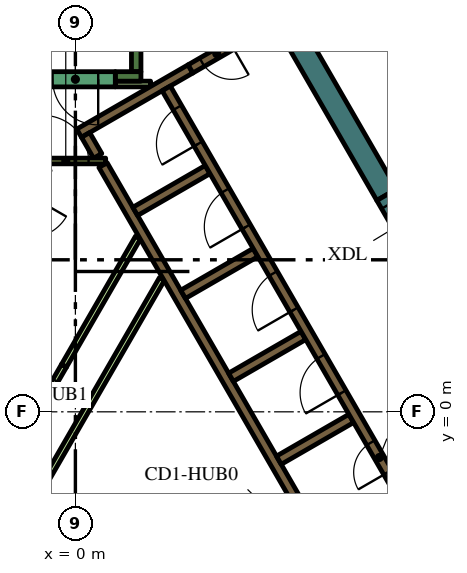
"""IFC4 building model, lengths in metres.
Left out: names, types, materials, properties, quantities, classifications, styles, units other than length and angle.
Written with IfcOpenShell. Run it as: python <this file> out.ifc"""

import sys

from ifc_helpers import new_model, si_unit, direction, frame, frame_2d, origin, place, context, subcontext, project, spatial, rectangle, extrude, element, fill, save


model = new_model("IFC4")
c1 = context("Model", 3, precision=1e-05, world=origin(), true_north=direction((0.0, 1.0)))
c2 = subcontext(c1, "Body", "Model", "MODEL_VIEW")
j1 = project(units=[si_unit("LENGTHUNIT", "METRE"), si_unit("PLANEANGLEUNIT", "RADIAN")], contexts=[c1])
p1 = place(None, origin())
s1 = spatial("IfcSite", under=j1, at=p1, CompositionType="ELEMENT")
p2 = place(p1, origin())
s2 = spatial("IfcBuilding", under=s1, at=p2, CompositionType="ELEMENT")
p3 = place(p2, frame((0.0, 0.0, 300.6)))
s3 = spatial("IfcBuildingStorey", under=s2, at=p3, CompositionType="ELEMENT", Elevation=300.6)
p4 = place(p3, frame((8.192, 5.711, 0.0), z_axis=(0.0, 0.0, 1.0), x_axis=(-0.500006836656, 0.866021456604, 0.0)))
e1 = element("IfcWall", 1, at=p4, inside=s3, PredefinedType="SOLIDWALL", context=c2, shape_type="SweptSolid", body=[
    extrude(rectangle(XDim=5.078, YDim=0.6, at=frame_2d((2.539, 0.0))), origin(), (0.0, 0.0, 1.0), 4.2),
])
p5 = place(p3, frame((1.6, 8.95, 0.0), z_axis=(0.0, 0.0, 1.0), x_axis=(0.0, 1.0, 0.0)))
e2 = element("IfcWall", 2, at=p5, inside=s3, PredefinedType="SOLIDWALL", context=c2, shape_type="SweptSolid", body=[
    extrude(rectangle(XDim=6.8, YDim=0.25, at=frame_2d((3.4, 0.0))), origin(), (0.0, 0.0, 1.0), 4.2),
])
p6 = place(p3, frame((1.05, 8.825, 0.0), z_axis=(0.0, 0.0, 1.0), x_axis=(1.0, 0.0, 0.0)))
e3 = element("IfcWall", 3, at=p6, inside=s3, PredefinedType="SOLIDWALL", context=c2, shape_type="SweptSolid", body=[
    extrude(rectangle(XDim=0.675, YDim=0.25, at=frame_2d((0.337, 0.0))), origin(), (0.0, 0.0, 1.0), 4.2),
])
p7 = place(p3, frame((9.19, -1.969, 0.0), z_axis=(0.0, 0.0, 1.0), x_axis=(-0.866057109641, -0.499945079824, 0.0)))
e4 = element("IfcWall", 4, at=p7, inside=s3, PredefinedType="SOLIDWALL", context=c2, shape_type="SweptSolid", body=[
    extrude(rectangle(XDim=3.291, YDim=0.25, at=frame_2d((1.646, 0.0))), origin(), (0.0, 0.0, 1.0), 4.2),
])
p8 = place(p3, frame((3.028, 9.023, 0.0), z_axis=(0.0, 0.0, 1.0), x_axis=(-0.866036587186, -0.49998062928, 0.0)))
e5 = element("IfcWall", 5, at=p8, inside=s3, PredefinedType="SOLIDWALL", context=c2, shape_type="SweptSolid", body=[
    extrude(rectangle(XDim=3.384, YDim=0.25, at=frame_2d((1.692, 0.0))), origin(), (0.0, 0.0, 1.0), 4.2),
])
p9 = place(p3, frame((0.268, 7.285, 0.0), z_axis=(0.0, 0.0, 1.0), x_axis=(0.500098681536, -0.865968422476, 0.0)))
e6 = element("IfcWall", 6, at=p9, inside=s3, PredefinedType="SOLIDWALL", context=c2, shape_type="SweptSolid", body=[
    extrude(rectangle(XDim=0.636, YDim=0.25, at=frame_2d((0.318, 0.0))), origin(), (0.0, 0.0, 1.0), 4.2),
])
p10 = place(p3, frame((5.97, -2.591, 0.0), z_axis=(0.0, 0.0, 1.0), x_axis=(-0.499994469932, 0.866028596547, 0.0)))
e7 = element("IfcWall", 7, at=p10, inside=s3, PredefinedType="SOLIDWALL", context=c2, shape_type="SweptSolid", body=[
    extrude(rectangle(XDim=10.488, YDim=0.25, at=frame_2d((5.244, 0.0))), origin(), (0.0, 0.0, 1.0), 4.2),
])
p11 = place(p3, frame((1.574, 5.274, 0.0), z_axis=(0.0, 0.0, 1.0), x_axis=(0.866028486751, 0.499994660107, 0.0)))
e8 = element("IfcWall", 8, at=p11, inside=s3, PredefinedType="SOLIDWALL", context=c2, shape_type="SweptSolid", body=[
    extrude(rectangle(XDim=2.2, YDim=0.25, at=frame_2d((1.1, 0.0))), origin(), (0.0, 0.0, 1.0), 4.2),
])
for number, where, z_axis, x_axis in (
    (9, (2.834, 3.091, 0.0), (0.0, 0.0, 1.0), (0.866, 0.5, 0.0)),
    (10, (4.094, 0.909, 0.0), (0.0, 0.0, 1.0), (0.866, 0.5, 0.0)),
    (11, (5.354, -1.274, 0.0), (0.0, 0.0, 1.0), (0.866, 0.5, 0.0)),
):
    element("IfcWall", number, at=place(p3, frame(where, z_axis=z_axis, x_axis=x_axis)), inside=s3, PredefinedType="SOLIDWALL", context=c2, shape_type="SweptSolid", body=[
        extrude(rectangle(XDim=2.2, YDim=0.25, at=frame_2d((1.1, 0.0))), origin(), (0.0, 0.0, 1.0), 4.2),
    ])
p12 = place(p3, frame((1.05, 8.625, 0.0), z_axis=(0.0, 0.0, 1.0), x_axis=(1.0, 0.0, 0.0)))
e12 = element("IfcWall", 12, at=p12, inside=s3, PredefinedType="PARTITIONING", context=c2, shape_type="SweptSolid", body=[
    extrude(rectangle(XDim=0.929, YDim=0.15, at=frame_2d((0.464, 0.0))), origin(), (0.0, 0.0, 1.0), 3.55),
])
p13 = place(p3, frame((-1.887, -3.718, 0.0), z_axis=(0.0, 0.0, 1.0), x_axis=(0.500005008002, 0.866022512394, 0.0)))
e13 = element("IfcWall", 13, at=p13, inside=s3, PredefinedType="PARTITIONING", context=c2, shape_type="SweptSolid", body=[
    extrude(rectangle(XDim=8.327, YDim=0.15, at=frame_2d((4.164, 0.0))), origin(), (0.0, 0.0, 1.0), 3.55),
])
p14 = place(p3, frame((-0.3, 1.212, 0.0), z_axis=(0.0, 0.0, 1.0), x_axis=(0.499963101113, 0.866046706318, 0.0)))
e14 = element("IfcWall", 14, at=p14, inside=s3, PredefinedType="PARTITIONING", context=c2, shape_type="SweptSolid", body=[
    extrude(rectangle(XDim=3.893, YDim=0.15, at=frame_2d((1.947, 0.0))), origin(), (0.0, 0.0, 1.0), 3.55),
])
p15 = place(p3, frame((8.565, -2.185, 0.0), z_axis=(0.0, 0.0, 1.0), x_axis=(-0.499997954832, 0.866026584559, 0.0)))
e15 = element("IfcWall", 15, at=p15, inside=s3, PredefinedType="SOLIDWALL", context=c2, shape_type="SweptSolid", body=[
    extrude(rectangle(XDim=12.35, YDim=0.25, at=frame_2d((6.175, 0.0))), origin(), (0.0, 0.0, 1.0), 4.2),
])
p16 = place(p15, frame((0.685, 0.0, 0.0)))
e16 = element("IfcOpeningElement", 16, at=p16, cuts=e15, PredefinedType="OPENING", context=c2, shape_type="SweptSolid", body=[
    extrude(rectangle(XDim=0.9, YDim=2.1, at=frame_2d((0.45, 1.05))), frame((0.0, 0.135, 0.0), z_axis=(0.0, -1.0, 0.0), x_axis=(1.0, 0.0, 0.0)), (0.0, 0.0, 1.0), 0.27),
])
p17 = place(p15, frame((3.105, 0.0, 0.0)))
e17 = element("IfcOpeningElement", 17, at=p17, cuts=e15, PredefinedType="OPENING", context=c2, shape_type="SweptSolid", body=[
    extrude(rectangle(XDim=1.1, YDim=2.1, at=frame_2d((0.55, 1.05))), frame((0.0, 0.135, 0.0), z_axis=(0.0, -1.0, 0.0), x_axis=(1.0, 0.0, 0.0)), (0.0, 0.0, 1.0), 0.27),
])
p18 = place(p15, frame((5.625, 0.0, 0.0)))
e18 = element("IfcOpeningElement", 18, at=p18, cuts=e15, PredefinedType="OPENING", context=c2, shape_type="SweptSolid", body=[
    extrude(rectangle(XDim=1.1, YDim=2.1, at=frame_2d((0.55, 1.05))), frame((0.0, 0.135, 0.0), z_axis=(0.0, -1.0, 0.0), x_axis=(1.0, 0.0, 0.0)), (0.0, 0.0, 1.0), 0.27),
])
p19 = place(p15, frame((8.145, 0.0, 0.0)))
e19 = element("IfcOpeningElement", 19, at=p19, cuts=e15, PredefinedType="OPENING", context=c2, shape_type="SweptSolid", body=[
    extrude(rectangle(XDim=1.1, YDim=2.1, at=frame_2d((0.55, 1.05))), frame((0.0, 0.135, 0.0), z_axis=(0.0, -1.0, 0.0), x_axis=(1.0, 0.0, 0.0)), (0.0, 0.0, 1.0), 0.27),
])
p20 = place(p15, frame((10.665, 0.0, 0.0)))
e20 = element("IfcOpeningElement", 20, at=p20, cuts=e15, PredefinedType="OPENING", context=c2, shape_type="SweptSolid", body=[
    extrude(rectangle(XDim=1.1, YDim=2.1, at=frame_2d((0.55, 1.05))), frame((0.0, 0.135, 0.0), z_axis=(0.0, -1.0, 0.0), x_axis=(1.0, 0.0, 0.0)), (0.0, 0.0, 1.0), 0.27),
])
p21 = place(p3, frame((1.05, 8.75, 0.0), z_axis=(0.0, 0.0, 1.0), x_axis=(-1.0, 0.0, 0.0)))
e21 = element("IfcWall", 21, at=p21, inside=s3, PredefinedType="SOLIDWALL", context=c2, shape_type="SweptSolid", body=[
    extrude(rectangle(XDim=2.1, YDim=0.4, at=frame_2d((1.05, 0.0))), origin(), (0.0, 0.0, 1.0), 4.2),
])
p22 = place(p21, frame((0.45, 0.0, 0.0)))
e22 = element("IfcOpeningElement", 22, at=p22, cuts=e21, PredefinedType="OPENING", context=c2, shape_type="SweptSolid", body=[
    extrude(rectangle(XDim=1.2, YDim=2.1, at=frame_2d((0.6, 1.05))), frame((0.0, 0.21, 0.0), z_axis=(0.0, -1.0, 0.0), x_axis=(1.0, 0.0, 0.0)), (0.0, 0.0, 1.0), 0.42),
])
p23 = place(p3, frame((5.366, 10.373, 0.0), z_axis=(0.0, 0.0, 1.0), x_axis=(-0.866019956843, -0.50000943426, 0.0)))
e23 = element("IfcWall", 23, at=p23, inside=s3, PredefinedType="SOLIDWALL", context=c2, shape_type="SweptSolid", body=[
    extrude(rectangle(XDim=2.7, YDim=0.25, at=frame_2d((1.35, 0.0))), origin(), (0.0, 0.0, 1.0), 4.2),
])
p24 = place(p23, frame((1.45, 0.0, 0.0)))
e24 = element("IfcOpeningElement", 24, at=p24, cuts=e23, PredefinedType="OPENING", context=c2, shape_type="SweptSolid", body=[
    extrude(rectangle(XDim=0.9, YDim=2.1, at=frame_2d((0.45, 1.05))), frame((0.0, 0.135, 0.0), z_axis=(0.0, -1.0, 0.0), x_axis=(1.0, 0.0, 0.0)), (0.0, 0.0, 1.0), 0.27),
])
p25 = place(p3, frame((-1.303, 6.6, 0.0), z_axis=(0.0, 0.0, 1.0), x_axis=(1.0, 0.0, 0.0)))
e25 = element("IfcWall", 25, at=p25, inside=s3, PredefinedType="PARTITIONING", context=c2, shape_type="SweptSolid", body=[
    extrude(rectangle(XDim=2.1, YDim=0.15, at=frame_2d((1.05, 0.0))), origin(), (0.0, 0.0, 1.0), 4.2),
])
p26 = place(p25, frame((0.45, 0.0, 0.0)))
e26 = element("IfcOpeningElement", 26, at=p26, cuts=e25, PredefinedType="OPENING", context=c2, shape_type="SweptSolid", body=[
    extrude(rectangle(XDim=1.2, YDim=2.1, at=frame_2d((0.6, 1.05))), frame((0.0, 0.085, 0.0), z_axis=(0.0, -1.0, 0.0), x_axis=(1.0, 0.0, 0.0)), (0.0, 0.0, 1.0), 0.17),
])
p27 = place(p3, frame((8.192, 5.711, 0.0), z_axis=(0.0, 0.0, 1.0), x_axis=(0.500062241894, -0.865989465428, 0.0)))
e27 = element("IfcWall", 27, at=p27, inside=s3, PredefinedType="SOLIDWALL", context=c2, shape_type="SweptSolid", body=[
    extrude(rectangle(XDim=1.7, YDim=0.6, at=frame_2d((0.85, 0.0))), origin(), (0.0, 0.0, 1.0), 4.2),
])
p28 = place(p27, frame((0.25, 0.0, 0.0)))
e28 = element("IfcOpeningElement", 28, at=p28, cuts=e27, PredefinedType="OPENING", context=c2, shape_type="SweptSolid", body=[
    extrude(rectangle(XDim=1.2, YDim=2.1, at=frame_2d((0.6, 1.05))), frame((0.0, 0.31, 0.0), z_axis=(0.0, -1.0, 0.0), x_axis=(1.0, 0.0, 0.0)), (0.0, 0.0, 1.0), 0.62),
])
p29 = place(p3, frame((-1.2, -0.346, 0.0), z_axis=(0.0, 0.0, 1.0), x_axis=(0.499961193289, 0.866047807691, 0.0)))
e29 = element("IfcWall", 29, at=p29, inside=s3, PredefinedType="PARTITIONING", context=c2, shape_type="SweptSolid", body=[
    extrude(rectangle(XDim=1.8, YDim=0.15, at=frame_2d((0.9, 0.0))), origin(), (0.0, 0.0, 1.0), 3.55),
])
p30 = place(p29, frame((0.45, 0.0, 0.0)))
e30 = element("IfcOpeningElement", 30, at=p30, cuts=e29, PredefinedType="OPENING", context=c2, shape_type="SweptSolid", body=[
    extrude(rectangle(XDim=0.9, YDim=2.1, at=frame_2d((0.45, 1.05))), frame((0.0, 0.085, 0.0), z_axis=(0.0, -1.0, 0.0), x_axis=(1.0, 0.0, 0.0)), (0.0, 0.0, 1.0), 0.17),
])
p31 = place(p3, frame((13.436, 0.829, 0.0), z_axis=(0.0, 0.0, 1.0), x_axis=(-0.49999894854, 0.866026010844, 0.0)))
e31 = element("IfcWall", 31, at=p31, inside=s3, PredefinedType="PARTITIONING", context=c2, shape_type="SweptSolid", body=[
    extrude(rectangle(XDim=12.0, YDim=0.2, at=frame_2d((6.0, 0.0))), origin(), (0.0, 0.0, 1.0), 3.55),
])
p32 = place(p31, frame((5.5, 0.0, 0.0)))
e32 = element("IfcOpeningElement", 32, at=p32, cuts=e31, PredefinedType="OPENING", context=c2, shape_type="SweptSolid", body=[
    extrude(rectangle(XDim=1.0, YDim=2.1, at=frame_2d((0.5, 1.05))), frame((0.0, 0.11, 0.0), z_axis=(0.0, -1.0, 0.0), x_axis=(1.0, 0.0, 0.0)), (0.0, 0.0, 1.0), 0.22),
])
p33 = place(p16, origin())
e33 = element("IfcDoor", 33, at=p33, inside=s3, OperationType="SINGLE_SWING_LEFT", PredefinedType="DOOR", context=c2, shape_type="SweptSolid", body=[
    extrude(rectangle(XDim=0.9, YDim=2.1, at=frame_2d((0.45, 1.05))), frame((0.0, 0.025, 0.0), z_axis=(0.0, -1.0, 0.0), x_axis=(1.0, 0.0, 0.0)), (0.0, 0.0, 1.0), 0.05),
])
fill(e16, e33)
p34 = place(p17, origin())
e34 = element("IfcDoor", 34, at=p34, inside=s3, OperationType="DOUBLE_DOOR_SLIDING", PredefinedType="DOOR", context=c2, shape_type="SweptSolid", body=[
    extrude(rectangle(XDim=1.1, YDim=2.1, at=frame_2d((0.55, 1.05))), frame((0.0, 0.025, 0.0), z_axis=(0.0, -1.0, 0.0), x_axis=(1.0, 0.0, 0.0)), (0.0, 0.0, 1.0), 0.05),
])
fill(e17, e34)
p35 = place(p18, origin())
e35 = element("IfcDoor", 35, at=p35, inside=s3, OperationType="DOUBLE_DOOR_SLIDING", PredefinedType="DOOR", context=c2, shape_type="SweptSolid", body=[
    extrude(rectangle(XDim=1.1, YDim=2.1, at=frame_2d((0.55, 1.05))), frame((0.0, 0.025, 0.0), z_axis=(0.0, -1.0, 0.0), x_axis=(1.0, 0.0, 0.0)), (0.0, 0.0, 1.0), 0.05),
])
fill(e18, e35)
p36 = place(p19, origin())
e36 = element("IfcDoor", 36, at=p36, inside=s3, OperationType="DOUBLE_DOOR_SLIDING", PredefinedType="DOOR", context=c2, shape_type="SweptSolid", body=[
    extrude(rectangle(XDim=1.1, YDim=2.1, at=frame_2d((0.55, 1.05))), frame((0.0, 0.025, 0.0), z_axis=(0.0, -1.0, 0.0), x_axis=(1.0, 0.0, 0.0)), (0.0, 0.0, 1.0), 0.05),
])
fill(e19, e36)
p37 = place(p20, origin())
e37 = element("IfcDoor", 37, at=p37, inside=s3, OperationType="DOUBLE_DOOR_SLIDING", PredefinedType="DOOR", context=c2, shape_type="SweptSolid", body=[
    extrude(rectangle(XDim=1.1, YDim=2.1, at=frame_2d((0.55, 1.05))), frame((0.0, 0.025, 0.0), z_axis=(0.0, -1.0, 0.0), x_axis=(1.0, 0.0, 0.0)), (0.0, 0.0, 1.0), 0.05),
])
fill(e20, e37)
p38 = place(p22, origin())
e38 = element("IfcDoor", 38, at=p38, inside=s3, OperationType="SINGLE_SWING_LEFT", PredefinedType="DOOR", context=c2, shape_type="SweptSolid", body=[
    extrude(rectangle(XDim=1.2, YDim=2.1, at=frame_2d((0.6, 1.05))), frame((0.0, 0.025, 0.0), z_axis=(0.0, -1.0, 0.0), x_axis=(1.0, 0.0, 0.0)), (0.0, 0.0, 1.0), 0.05),
])
fill(e22, e38)
p39 = place(p24, origin())
e39 = element("IfcDoor", 39, at=p39, inside=s3, OperationType="SINGLE_SWING_LEFT", PredefinedType="DOOR", context=c2, shape_type="SweptSolid", body=[
    extrude(rectangle(XDim=0.9, YDim=2.1, at=frame_2d((0.45, 1.05))), frame((0.0, 0.025, 0.0), z_axis=(0.0, -1.0, 0.0), x_axis=(1.0, 0.0, 0.0)), (0.0, 0.0, 1.0), 0.05),
])
fill(e24, e39)
p40 = place(p26, origin())
e40 = element("IfcDoor", 40, at=p40, inside=s3, OperationType="SINGLE_SWING_LEFT", PredefinedType="DOOR", context=c2, shape_type="SweptSolid", body=[
    extrude(rectangle(XDim=1.2, YDim=2.1, at=frame_2d((0.6, 1.05))), frame((0.0, 0.025, 0.0), z_axis=(0.0, -1.0, 0.0), x_axis=(1.0, 0.0, 0.0)), (0.0, 0.0, 1.0), 0.05),
])
fill(e26, e40)
p41 = place(p30, origin())
e41 = element("IfcDoor", 41, at=p41, inside=s3, OperationType="SINGLE_SWING_LEFT", PredefinedType="DOOR", context=c2, shape_type="SweptSolid", body=[
    extrude(rectangle(XDim=0.9, YDim=2.1, at=frame_2d((0.45, 1.05))), frame((0.0, 0.025, 0.0), z_axis=(0.0, -1.0, 0.0), x_axis=(1.0, 0.0, 0.0)), (0.0, 0.0, 1.0), 0.05),
])
fill(e30, e41)
save(model, sys.argv[1])
